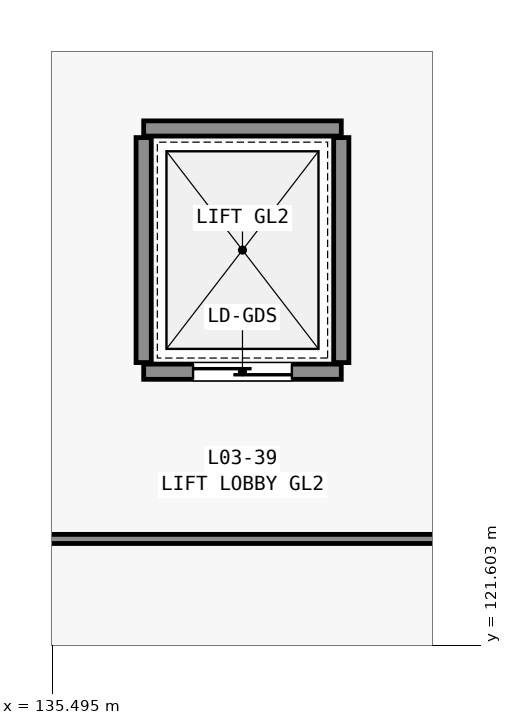
"""IFC4 building model, lengths in metres.
Left out: names, types, materials, properties, quantities, classifications, styles, units other than length and angle.
Written with IfcOpenShell. Run it as: python <this file> out.ifc"""

import sys

from ifc_helpers import new_model, si_unit, direction, frame, frame_2d, origin, place, context, subcontext, project, spatial, rectangle, extrude, element, fill, save


model = new_model("IFC4")
c1 = context("Model", 3, precision=1e-05, world=origin(), true_north=direction((0.0, 1.0)))
c2 = subcontext(c1, "Body", "Model", "MODEL_VIEW")
j1 = project(units=[si_unit("LENGTHUNIT", "METRE"), si_unit("PLANEANGLEUNIT", "RADIAN")], contexts=[c1])
p1 = place(None, origin())
s1 = spatial("IfcSite", under=j1, at=p1, CompositionType="ELEMENT")
p2 = place(p1, origin())
s2 = spatial("IfcBuilding", under=s1, at=p2, CompositionType="ELEMENT")
p3 = place(p2, frame((0.0, 0.0, 16.2)))
s3 = spatial("IfcBuildingStorey", under=s2, at=p3, CompositionType="ELEMENT", Elevation=16.2)
p4 = place(p3, frame((136.7, 125.2, 0.0), z_axis=(0.0, 0.0, 1.0), x_axis=(1.0, 0.0, 0.0)))
e1 = element("IfcWall", 1, at=p4, inside=s3, PredefinedType="STANDARD", context=c2, shape_type="SweptSolid", body=[
    extrude(rectangle(XDim=2.6, YDim=0.2, at=frame_2d((1.3, 0.0))), origin(), (0.0, 0.0, 1.0), 4.46),
])
p5 = place(p4, frame((0.65, 0.0, 0.0)))
e2 = element("IfcOpeningElement", 2, at=p5, cuts=e1, PredefinedType="OPENING", context=c2, shape_type="SweptSolid", body=[
    extrude(rectangle(XDim=1.3, YDim=2.15, at=frame_2d((0.65, 1.075))), frame((0.0, 0.11, 0.0), z_axis=(0.0, -1.0, 0.0), x_axis=(1.0, 0.0, 0.0)), (0.0, 0.0, 1.0), 0.22),
])
p6 = place(p3, frame((136.7, 128.4, 0.0), z_axis=(0.0, 0.0, 1.0), x_axis=(1.0, 0.0, 0.0)))
e3 = element("IfcWall", 3, at=p6, inside=s3, PredefinedType="STANDARD", context=c2, shape_type="SweptSolid", body=[
    extrude(rectangle(XDim=2.6, YDim=0.2, at=frame_2d((1.3, 0.0))), origin(), (0.0, 0.0, 1.0), 4.46),
])
for number, where, z_axis, x_axis in (
    (4, (136.7, 125.32, 0.0), (0.0, 0.0, 1.0), (0.0, 1.0, 0.0)),
    (5, (139.3, 125.32, 0.0), (0.0, 0.0, 1.0), (0.0, 1.0, 0.0)),
):
    element("IfcWall", number, at=place(p3, frame(where, z_axis=z_axis, x_axis=x_axis)), inside=s3, PredefinedType="STANDARD", context=c2, shape_type="SweptSolid", body=[
        extrude(rectangle(XDim=2.96, YDim=0.2, at=frame_2d((1.48, 0.0))), origin(), (0.0, 0.0, 1.0), 4.46),
    ])
p7 = place(p3, frame((113.5, 123.0, 0.0), z_axis=(0.0, 0.0, 1.0), x_axis=(1.0, 0.0, 0.0)))
e6 = element("IfcWall", 6, at=p7, inside=s3, PredefinedType="PARTITIONING", context=c2, shape_type="SweptSolid", body=[
    extrude(rectangle(XDim=30.5, YDim=0.12, at=frame_2d((15.25, 0.0))), origin(), (0.0, 0.0, 1.0), 3.848),
])
p8 = place(p5, origin())
e7 = element("IfcDoor", 7, at=p8, inside=s3, OperationType="SLIDING_TO_LEFT", PredefinedType="DOOR", context=c2, shape_type="SweptSolid", body=[
    extrude(rectangle(XDim=1.3, YDim=2.15, at=frame_2d((0.65, 1.075))), frame((0.0, 0.025, 0.0), z_axis=(0.0, -1.0, 0.0), x_axis=(1.0, 0.0, 0.0)), (0.0, 0.0, 1.0), 0.05),
])
fill(e2, e7)
save(model, sys.argv[1])
